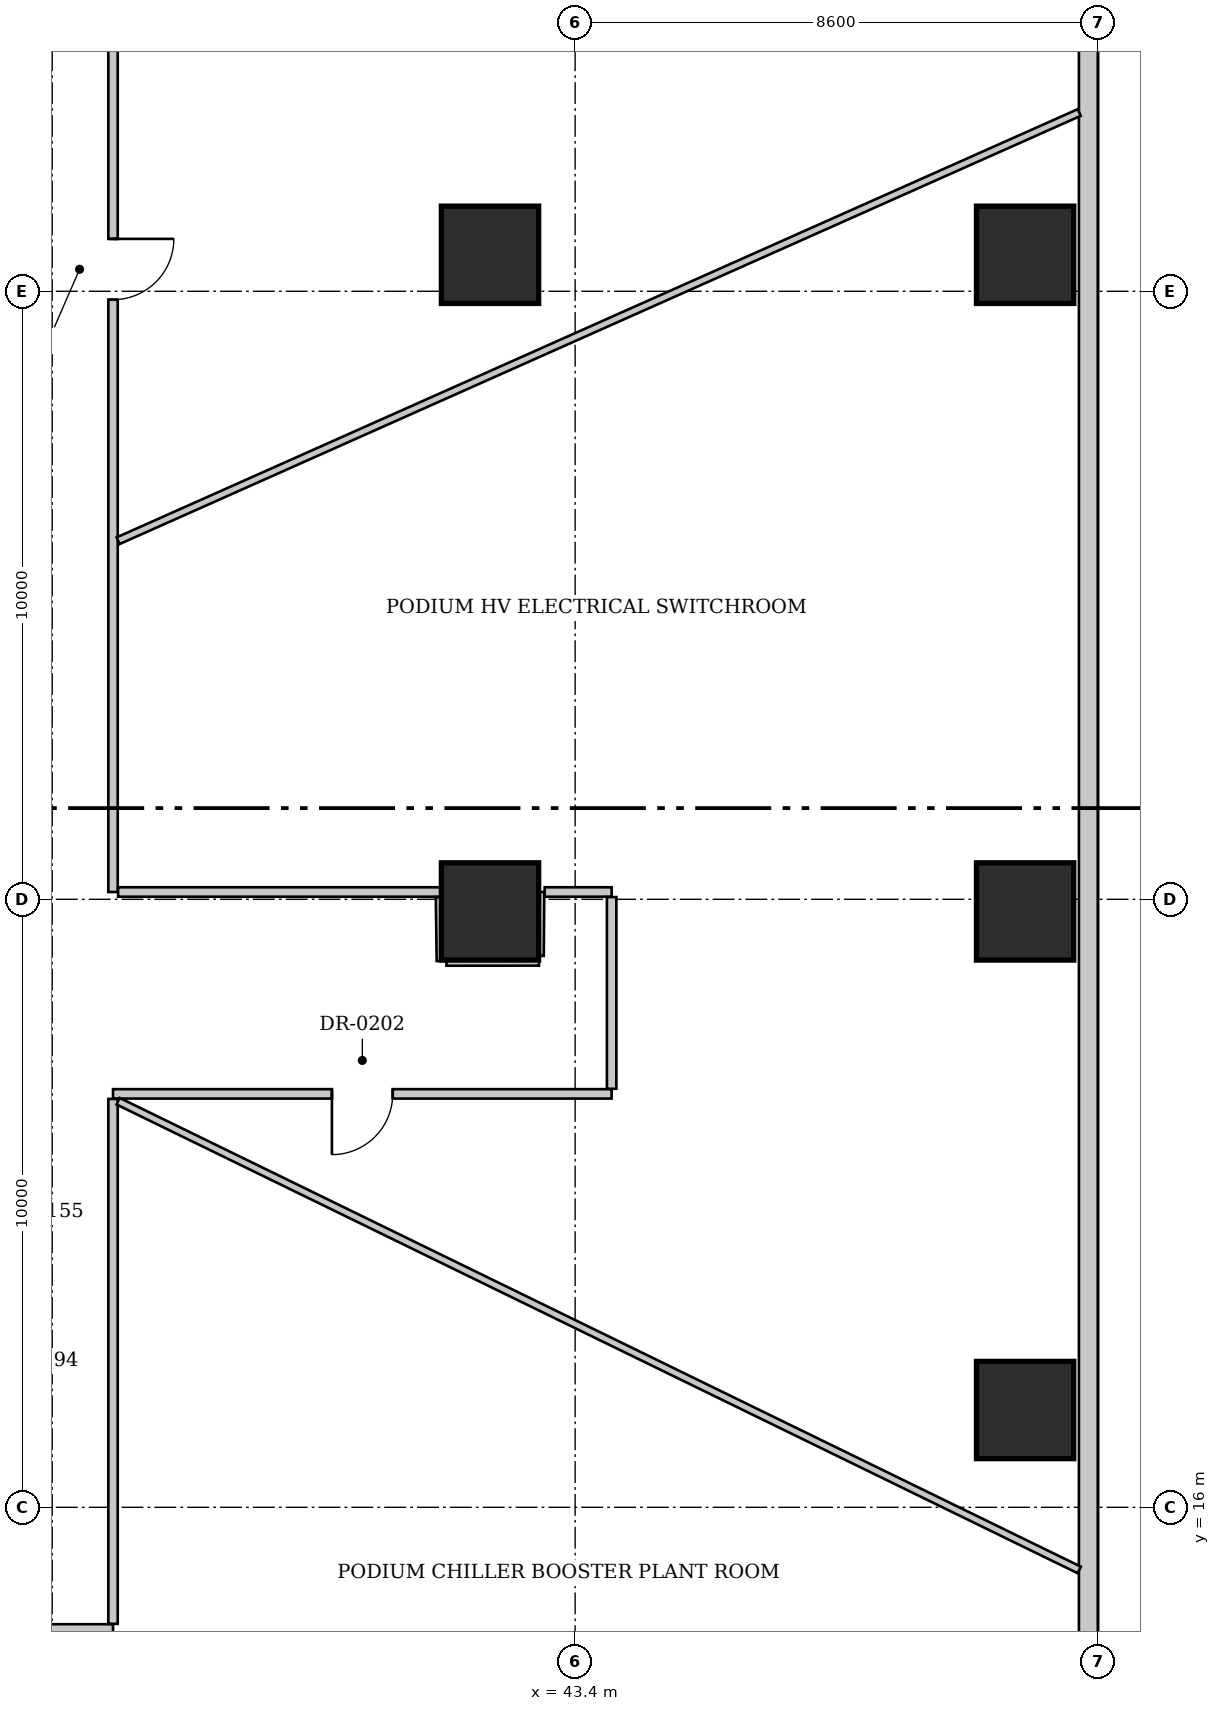
"""IFC4 building model, lengths in metres.
Left out: names, types, materials, properties, quantities, classifications, styles, units other than length and angle.
Written with IfcOpenShell. Run it as: python <this file> out.ifc"""

import sys

from ifc_helpers import new_model, si_unit, direction, frame, frame_2d, origin, origin_2d, place, context, subcontext, project, spatial, rectangle, extrude, source, transform, mapped, element, fill, save


model = new_model("IFC4")
c1 = context("Model", 3, precision=1e-05, world=origin(), true_north=direction((0.0, 1.0)))
c2 = subcontext(c1, "Body", "Model", "MODEL_VIEW")
j1 = project(units=[si_unit("LENGTHUNIT", "METRE"), si_unit("PLANEANGLEUNIT", "RADIAN")], contexts=[c1])
p1 = place(None, origin())
s1 = spatial("IfcSite", under=j1, at=p1, CompositionType="ELEMENT")
p2 = place(p1, origin())
s2 = spatial("IfcBuilding", under=s1, at=p2, CompositionType="ELEMENT")
p3 = place(p2, frame((0.0, 0.0, 19.0)))
s3 = spatial("IfcBuildingStorey", under=s2, at=p3, CompositionType="ELEMENT", Elevation=19.0)
for number, where, z_axis, x_axis in (
    (1, (50.8, 17.6, 0.0), (0.0, 0.0, 1.0), (1.0, 0.0, 0.0)),
    (2, (50.8, 25.8, 0.0), (0.0, 0.0, 1.0), (1.0, 0.0, 0.0)),
    (3, (50.8, 36.6, 0.0), (0.0, 0.0, 1.0), (1.0, 0.0, 0.0)),
    (4, (42.0, 25.8, 0.0), (0.0, 0.0, 1.0), (1.0, 0.0, 0.0)),
    (5, (42.0, 36.6, 0.0), (0.0, 0.0, 1.0), (1.0, 0.0, 0.0)),
):
    element("IfcColumn", number, at=place(p3, frame(where, z_axis=z_axis, x_axis=x_axis)), inside=s3, PredefinedType="COLUMN", context=c2, shape_type="SweptSolid", body=[
        extrude(rectangle(XDim=1.6, YDim=1.6, at=origin_2d()), origin(), (0.0, 0.0, 1.0), 4.55),
    ])
p4 = place(p3, frame((51.84, 47.84, 0.0), z_axis=(0.0, 0.0, 1.0), x_axis=(0.0, -1.0, 0.0)))
e6 = element("IfcWall", 6, at=p4, inside=s3, PredefinedType="SOLIDWALL", context=c2, shape_type="SweptSolid", body=[
    extrude(rectangle(XDim=39.68, YDim=0.31, at=frame_2d((19.84, 0.0))), origin(), (0.0, 0.0, 1.0), 4.45),
])
p5 = place(p3, frame((35.8, 40.917, 0.0), z_axis=(0.0, 0.0, 1.0), x_axis=(0.0, -1.0, 0.0)))
e7 = element("IfcWall", 7, at=p5, inside=s3, PredefinedType="PARTITIONING", context=c2, shape_type="SweptSolid", body=[
    extrude(rectangle(XDim=14.796, YDim=0.155, at=frame_2d((7.398, 0.0))), origin(), (0.0, 0.0, 1.0), 4.55),
])
p6 = place(p5, frame((4.055, 0.0, 0.0)))
e8 = element("IfcOpeningElement", 8, at=p6, cuts=e7, PredefinedType="OPENING", context=c2, shape_type="SweptSolid", body=[
    extrude(rectangle(XDim=1.0, YDim=2.15, at=frame_2d((0.5, 1.075))), frame((0.0, 0.087, 0.0), z_axis=(0.0, -1.0, 0.0), x_axis=(1.0, 0.0, 0.0)), (0.0, 0.0, 1.0), 0.175),
])
p7 = place(p3, frame((44.0, 22.8, 0.0), z_axis=(0.0, 0.0, 1.0), x_axis=(-1.0, 0.0, 0.0)))
e9 = element("IfcWall", 9, at=p7, inside=s3, PredefinedType="PARTITIONING", context=c2, shape_type="SweptSolid", body=[
    extrude(rectangle(XDim=8.2, YDim=0.155, at=frame_2d((4.1, 0.0))), origin(), (0.0, 0.0, 1.0), 4.55),
])
p8 = place(p7, frame((3.6, 0.0, 0.0)))
e10 = element("IfcOpeningElement", 10, at=p8, cuts=e9, PredefinedType="OPENING", context=c2, shape_type="SweptSolid", body=[
    extrude(rectangle(XDim=1.0, YDim=2.15, at=frame_2d((0.5, 1.075))), frame((0.0, 0.087, 0.0), z_axis=(0.0, -1.0, 0.0), x_axis=(1.0, 0.0, 0.0)), (0.0, 0.0, 1.0), 0.175),
])
p9 = place(p3, frame((35.8, 14.0, 0.0), z_axis=(0.0, 0.0, 1.0), x_axis=(-1.0, 0.0, 0.0)))
e11 = element("IfcWall", 11, at=p9, inside=s3, PredefinedType="PARTITIONING", context=c2, shape_type="SweptSolid", body=[
    extrude(rectangle(XDim=2.917, YDim=0.155, at=frame_2d((1.458, 0.0))), origin(), (0.0, 0.0, 1.0), 4.55),
])
p10 = place(p3, frame((35.884, 26.12, 0.0), z_axis=(0.0, 0.0, 1.0), x_axis=(1.0, 0.0, 0.0)))
e12 = element("IfcWall", 12, at=p10, inside=s3, PredefinedType="PARTITIONING", context=c2, shape_type="SweptSolid", body=[
    extrude(rectangle(XDim=5.302, YDim=0.155, at=frame_2d((2.651, 0.0))), origin(), (0.0, 0.0, 1.0), 4.55),
])
p11 = place(p3, frame((41.186, 26.037, 0.0), z_axis=(0.0, 0.0, 1.0), x_axis=(0.013233110982, -0.999912438553, 0.0)))
e13 = element("IfcWall", 13, at=p11, inside=s3, PredefinedType="PARTITIONING", context=c2, shape_type="SweptSolid", body=[
    extrude(rectangle(XDim=1.052, YDim=0.155, at=frame_2d((0.526, 0.0))), origin(), (0.0, 0.0, 1.0), 4.55),
])
p12 = place(p3, frame((41.283, 24.985, 0.0), z_axis=(0.0, 0.0, 1.0), x_axis=(0.999999794213, 0.000641539563, 0.0)))
e14 = element("IfcWall", 14, at=p12, inside=s3, PredefinedType="PARTITIONING", context=c2, shape_type="SweptSolid", body=[
    extrude(rectangle(XDim=1.522, YDim=0.155, at=frame_2d((0.761, 0.0))), origin(), (0.0, 0.0, 1.0), 4.55),
])
p13 = place(p3, frame((42.806, 25.07, 0.0), z_axis=(0.0, 0.0, 1.0), x_axis=(0.008133591044, 0.999966921801, 0.0)))
e15 = element("IfcWall", 15, at=p13, inside=s3, PredefinedType="PARTITIONING", context=c2, shape_type="SweptSolid", body=[
    extrude(rectangle(XDim=1.051, YDim=0.155, at=frame_2d((0.525, 0.0))), origin(), (0.0, 0.0, 1.0), 4.55),
])
p14 = place(p3, frame((42.898, 26.12, 0.0), z_axis=(0.0, 0.0, 1.0), x_axis=(1.0, 0.0, 0.0)))
e16 = element("IfcWall", 16, at=p14, inside=s3, PredefinedType="PARTITIONING", context=c2, shape_type="SweptSolid", body=[
    extrude(rectangle(XDim=1.102, YDim=0.155, at=frame_2d((0.551, 0.0))), origin(), (0.0, 0.0, 1.0), 4.55),
])
p15 = place(p3, frame((44.0, 26.037, 0.0), z_axis=(0.0, 0.0, 1.0), x_axis=(0.0, -1.0, 0.0)))
e17 = element("IfcWall", 17, at=p15, inside=s3, PredefinedType="PARTITIONING", context=c2, shape_type="SweptSolid", body=[
    extrude(rectangle(XDim=3.153, YDim=0.155, at=frame_2d((1.577, 0.0))), origin(), (0.0, 0.0, 1.0), 4.55),
])
p16 = place(p3, frame((35.8, 22.717, 0.0), z_axis=(0.0, 0.0, 1.0), x_axis=(0.0, -1.0, 0.0)))
e18 = element("IfcWall", 18, at=p16, inside=s3, PredefinedType="PARTITIONING", context=c2, shape_type="SweptSolid", body=[
    extrude(rectangle(XDim=8.633, YDim=0.155, at=frame_2d((4.316, 0.0))), origin(), (0.0, 0.0, 1.0), 4.55),
])
p17 = place(p3, frame((35.884, 22.679, 0.0), z_axis=(0.0, 0.0, 1.0), x_axis=(0.898795528505, -0.438368107805, 0.0)))
e19 = element("IfcWall", 19, at=p17, inside=s3, PredefinedType="PARTITIONING", context=c2, shape_type="SweptSolid", body=[
    extrude(rectangle(XDim=17.586, YDim=0.12, at=frame_2d((8.793, 0.0))), origin(), (0.0, 0.0, 1.0), 4.55),
])
p18 = place(p3, frame((35.884, 31.897, 0.0), z_axis=(0.0, 0.0, 1.0), x_axis=(0.913432401088, 0.406990477336, 0.0)))
e20 = element("IfcWall", 20, at=p18, inside=s3, PredefinedType="PARTITIONING", context=c2, shape_type="SweptSolid", body=[
    extrude(rectangle(XDim=17.304, YDim=0.12, at=frame_2d((8.652, 0.0))), origin(), (0.0, 0.0, 1.0), 4.55),
])
m1 = source(origin(), c2, "Body", "SweptSolid", [
    extrude(rectangle(XDim=1.0, YDim=2.15, at=frame_2d((0.5, 1.075))), frame((0.0, 0.025, 0.0), z_axis=(0.0, -1.0, 0.0), x_axis=(1.0, 0.0, 0.0)), (0.0, 0.0, 1.0), 0.05),
])
p19 = place(p6, origin())
e21 = element("IfcDoor", 21, at=p19, inside=s3, OperationType="SINGLE_SWING_LEFT", PredefinedType="DOOR", context=c2, shape_type="MappedRepresentation", body=[
    mapped(m1, transform((0.0, 0.0, 0.0), x_axis=(1.0, 0.0, 0.0), y_axis=(0.0, 1.0, 0.0), z_axis=(0.0, 0.0, 1.0), scale=1.0)),
])
fill(e8, e21)
p20 = place(p8, origin())
e22 = element("IfcDoor", 22, at=p20, inside=s3, OperationType="SINGLE_SWING_RIGHT", PredefinedType="DOOR", context=c2, shape_type="MappedRepresentation", body=[
    mapped(m1, transform((0.0, 0.0, 0.0), x_axis=(1.0, 0.0, 0.0), y_axis=(0.0, 1.0, 0.0), z_axis=(0.0, 0.0, 1.0), scale=1.0)),
])
fill(e10, e22)
save(model, sys.argv[1])
